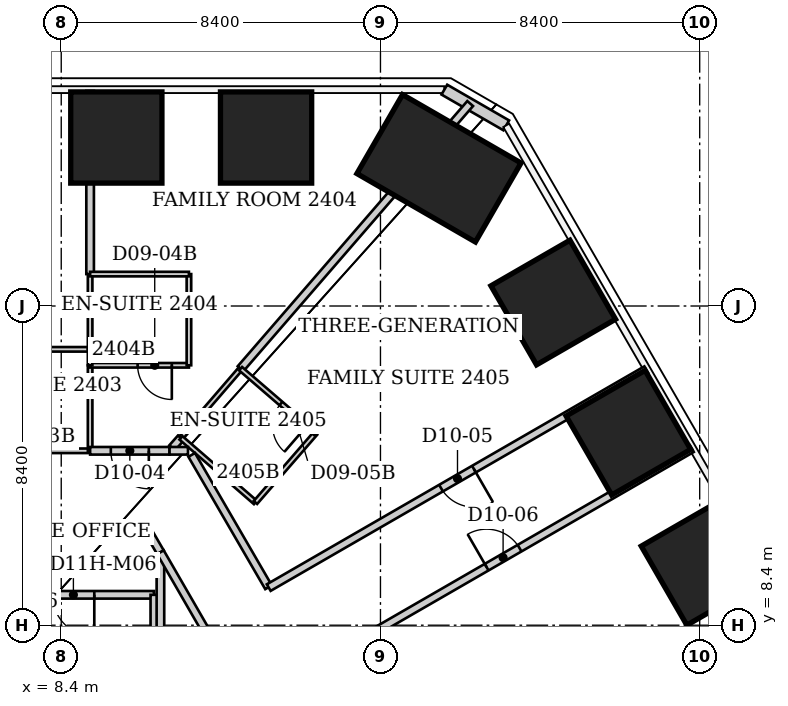
"""IFC4 building model, lengths in metres.
Left out: names, types, materials, properties, quantities, classifications, styles, units other than length and angle.
Written with IfcOpenShell. Run it as: python <this file> out.ifc"""

import sys

from ifc_helpers import new_model, si_unit, direction, frame, frame_2d, origin, origin_2d, place, context, subcontext, project, spatial, rectangle, extrude, element, fill, save


model = new_model("IFC4")
c1 = context("Model", 3, precision=1e-05, world=origin(), true_north=direction((0.0, 1.0)))
c2 = subcontext(c1, "Body", "Model", "MODEL_VIEW")
j1 = project(units=[si_unit("LENGTHUNIT", "METRE"), si_unit("PLANEANGLEUNIT", "RADIAN")], contexts=[c1])
p1 = place(None, origin())
s1 = spatial("IfcSite", under=j1, at=p1, CompositionType="ELEMENT")
p2 = place(p1, origin())
s2 = spatial("IfcBuilding", under=s1, at=p2, CompositionType="ELEMENT")
p3 = place(p2, frame((0.0, 0.0, 100.6)))
s3 = spatial("IfcBuildingStorey", under=s2, at=p3, CompositionType="ELEMENT", Elevation=100.6)
for number, where, z_axis, x_axis in (
    (1, (9.85, 21.234, 0.0), (0.0, 0.0, 1.0), (0.0, 1.0, 0.0)),
    (2, (13.79, 21.234, 0.0), (0.0, 0.0, 1.0), (0.0, 1.0, 0.0)),
):
    element("IfcColumn", number, at=place(p3, frame(where, z_axis=z_axis, x_axis=x_axis)), inside=s3, PredefinedType="COLUMN", context=c2, shape_type="SweptSolid", body=[
        extrude(rectangle(XDim=2.4, YDim=2.4, at=origin_2d()), origin(), (0.0, 0.0, 1.0), 3.8),
    ])
p4 = place(p3, frame((18.339, 20.424, 0.0), z_axis=(0.0, 0.0, 1.0), x_axis=(0.5, 0.866025403784, 0.0)))
e3 = element("IfcColumn", 3, at=p4, inside=s3, PredefinedType="COLUMN", context=c2, shape_type="SweptSolid", body=[
    extrude(rectangle(XDim=2.4, YDim=3.6, at=origin_2d()), origin(), (0.0, 0.0, 1.0), 3.8),
])
for number, where, z_axis, x_axis in (
    (4, (21.346, 16.891, 0.0), (0.0, 0.0, 1.0), (0.866, 0.5, 0.0)),
    (5, (23.324, 13.466, 0.0), (0.0, 0.0, 1.0), (0.866, 0.5, 0.0)),
    (6, (25.302, 10.041, 0.0), (0.0, 0.0, 1.0), (0.866, 0.5, 0.0)),
):
    element("IfcColumn", number, at=place(p3, frame(where, z_axis=z_axis, x_axis=x_axis)), inside=s3, PredefinedType="COLUMN", context=c2, shape_type="SweptSolid", body=[
        extrude(rectangle(XDim=2.4, YDim=2.4, at=origin_2d()), origin(), (0.0, 0.0, 1.0), 3.8),
    ])
p5 = place(p3, frame((18.481, 22.494, 0.0), z_axis=(0.0, 0.0, 1.0), x_axis=(0.865988793993, -0.500063404658, 0.0)))
e7 = element("IfcWall", 7, at=p5, inside=s3, PredefinedType="SOLIDWALL", context=c2, shape_type="SweptSolid", body=[
    extrude(rectangle(XDim=1.88, YDim=0.3, at=frame_2d((0.94, 0.0))), origin(), (0.0, 0.0, 1.0), 3.64),
])
p6 = place(p3, frame((6.6, 10.99, 0.0), z_axis=(0.0, 0.0, 1.0), x_axis=(1.0, 0.0, 0.0)))
e8 = element("IfcWall", 8, at=p6, inside=s3, PredefinedType="PARTITIONING", context=c2, shape_type="SweptSolid", body=[
    extrude(rectangle(XDim=4.02, YDim=0.2, at=frame_2d((2.01, 0.0))), origin(), (0.0, 0.0, 1.0), 3.64),
])
p7 = place(p3, frame((9.16, 12.99, 0.0), z_axis=(0.0, 0.0, 1.0), x_axis=(-1.0, 0.0, 0.0)))
e9 = element("IfcWall", 9, at=p7, inside=s3, PredefinedType="PARTITIONING", context=c2, shape_type="SweptSolid", body=[
    extrude(rectangle(XDim=2.45, YDim=0.12, at=frame_2d((1.225, 0.0))), origin(), (0.0, 0.0, 1.0), 3.64),
])
p8 = place(p3, frame((9.16, 15.24, 0.0), z_axis=(0.0, 0.0, 1.0), x_axis=(0.0, -1.0, 0.0)))
e10 = element("IfcWall", 10, at=p8, inside=s3, PredefinedType="PARTITIONING", context=c2, shape_type="SweptSolid", body=[
    extrude(rectangle(XDim=2.25, YDim=0.12, at=frame_2d((1.125, 0.0))), origin(), (0.0, 0.0, 1.0), 3.64),
])
p9 = place(p3, frame((9.16, 15.24, 0.0), z_axis=(0.0, 0.0, 1.0), x_axis=(1.0, 0.0, 0.0)))
e11 = element("IfcWall", 11, at=p9, inside=s3, PredefinedType="PARTITIONING", context=c2, shape_type="SweptSolid", body=[
    extrude(rectangle(XDim=2.6, YDim=0.12, at=frame_2d((1.3, 0.0))), origin(), (0.0, 0.0, 1.0), 3.64),
])
p10 = place(p9, frame((1.25, 0.0, 0.0)))
e12 = element("IfcOpeningElement", 12, at=p10, cuts=e11, PredefinedType="OPENING", context=c2, shape_type="SweptSolid", body=[
    extrude(rectangle(XDim=0.9, YDim=2.03, at=frame_2d((0.45, 1.015))), frame((0.0, 0.06, 0.0), z_axis=(0.0, -1.0, 0.0), x_axis=(1.0, 0.0, 0.0)), (0.0, 0.0, 1.0), 0.12),
])
p11 = place(p3, frame((9.16, 15.66, 0.0), z_axis=(0.0, 0.0, 1.0), x_axis=(-1.0, 0.0, 0.0)))
e13 = element("IfcWall", 13, at=p11, inside=s3, PredefinedType="PARTITIONING", context=c2, shape_type="SweptSolid", body=[
    extrude(rectangle(XDim=2.45, YDim=0.12, at=frame_2d((1.225, 0.0))), origin(), (0.0, 0.0, 1.0), 3.64),
])
p12 = place(p3, frame((9.16, 15.66, 0.0), z_axis=(0.0, 0.0, 1.0), x_axis=(0.0, -1.0, 0.0)))
e14 = element("IfcWall", 14, at=p12, inside=s3, PredefinedType="PARTITIONING", context=c2, shape_type="SweptSolid", body=[
    extrude(rectangle(XDim=0.42, YDim=0.12, at=frame_2d((0.21, 0.0))), origin(), (0.0, 0.0, 1.0), 3.64),
])
p13 = place(p3, frame((9.16, 17.64, 0.0), z_axis=(0.0, 0.0, 1.0), x_axis=(0.0, -1.0, 0.0)))
e15 = element("IfcWall", 15, at=p13, inside=s3, PredefinedType="PARTITIONING", context=c2, shape_type="SweptSolid", body=[
    extrude(rectangle(XDim=1.98, YDim=0.12, at=frame_2d((0.99, 0.0))), origin(), (0.0, 0.0, 1.0), 3.64),
])
p14 = place(p3, frame((9.16, 22.46, 0.0), z_axis=(0.0, 0.0, 1.0), x_axis=(0.0, -1.0, 0.0)))
e16 = element("IfcWall", 16, at=p14, inside=s3, PredefinedType="PARTITIONING", context=c2, shape_type="SweptSolid", body=[
    extrude(rectangle(XDim=4.82, YDim=0.2, at=frame_2d((2.41, 0.0))), origin(), (0.0, 0.0, 1.0), 3.64),
])
p15 = place(p3, frame((10.62, 10.99, 0.0), z_axis=(0.0, 0.0, 1.0), x_axis=(0.503009091795, -0.864281119527, 0.0)))
e17 = element("IfcWall", 17, at=p15, inside=s3, PredefinedType="PARTITIONING", context=c2, shape_type="SweptSolid", body=[
    extrude(rectangle(XDim=0.775, YDim=0.2, at=frame_2d((0.388, 0.0))), origin(), (0.0, 0.0, 1.0), 3.64),
])
p16 = place(p3, frame((10.84, 9.2, 0.0), z_axis=(0.0, 0.0, 1.0), x_axis=(-1.0, 0.0, 0.0)))
e18 = element("IfcWall", 18, at=p16, inside=s3, PredefinedType="PARTITIONING", context=c2, shape_type="SweptSolid", body=[
    extrude(rectangle(XDim=4.24, YDim=0.2, at=frame_2d((2.12, 0.0))), origin(), (0.0, 0.0, 1.0), 3.64),
])
p17 = place(p16, frame((1.57, 0.0, 0.0)))
e19 = element("IfcOpeningElement", 19, at=p17, cuts=e18, PredefinedType="OPENING", context=c2, shape_type="SweptSolid", body=[
    extrude(rectangle(XDim=1.1, YDim=2.2, at=frame_2d((0.55, 1.1))), frame((0.0, 0.1, 0.0), z_axis=(0.0, -1.0, 0.0), x_axis=(1.0, 0.0, 0.0)), (0.0, 0.0, 1.0), 0.2),
])
p18 = place(p3, frame((10.85, -4.91, 0.0), z_axis=(0.0, 0.0, 1.0), x_axis=(0.0, 1.0, 0.0)))
e20 = element("IfcWall", 20, at=p18, inside=s3, PredefinedType="PARTITIONING", context=c2, shape_type="SweptSolid", body=[
    extrude(rectangle(XDim=14.11, YDim=0.2, at=frame_2d((7.055, 0.0))), origin(), (0.0, 0.0, 1.0), 3.64),
])
p19 = place(p3, frame((11.01, 10.125, 0.0), z_axis=(0.0, 0.0, 1.0), x_axis=(0.0, -1.0, 0.0)))
e21 = element("IfcWall", 21, at=p19, inside=s3, PredefinedType="PARTITIONING", context=c2, shape_type="SweptSolid", body=[
    extrude(rectangle(XDim=14.855, YDim=0.2, at=frame_2d((7.427, 0.0))), origin(), (0.0, 0.0, 1.0), 3.64),
])
p20 = place(p3, frame((11.01, 10.32, 0.0), z_axis=(0.0, 0.0, 1.0), x_axis=(0.500036278648, -0.866004457284, 0.0)))
e22 = element("IfcWall", 22, at=p20, inside=s3, PredefinedType="PARTITIONING", context=c2, shape_type="SweptSolid", body=[
    extrude(rectangle(XDim=8.799, YDim=0.2, at=frame_2d((4.399, 0.0))), origin(), (0.0, 0.0, 1.0), 3.64),
])
p21 = place(p3, frame((11.25, 12.99, 0.0), z_axis=(0.0, 0.0, 1.0), x_axis=(-1.0, 0.0, 0.0)))
e23 = element("IfcWall", 23, at=p21, inside=s3, PredefinedType="PARTITIONING", context=c2, shape_type="SweptSolid", body=[
    extrude(rectangle(XDim=2.09, YDim=0.2, at=frame_2d((1.045, 0.0))), origin(), (0.0, 0.0, 1.0), 3.64),
])
p22 = place(p21, frame((0.545, 0.0, 0.0)))
e24 = element("IfcOpeningElement", 24, at=p22, cuts=e23, PredefinedType="OPENING", context=c2, shape_type="SweptSolid", body=[
    extrude(rectangle(XDim=1.0, YDim=2.13, at=frame_2d((0.5, 1.065))), frame((0.0, 0.1, 0.0), z_axis=(0.0, -1.0, 0.0), x_axis=(1.0, 0.0, 0.0)), (0.0, 0.0, 1.0), 0.2),
])
p23 = place(p3, frame((11.32, 13.069, 0.0), z_axis=(0.0, 0.0, 1.0), x_axis=(0.661575277995, 0.749878757897, 0.0)))
e25 = element("IfcWall", 25, at=p23, inside=s3, PredefinedType="PARTITIONING", context=c2, shape_type="SweptSolid", body=[
    extrude(rectangle(XDim=0.348, YDim=0.2, at=frame_2d((0.174, 0.0))), origin(), (0.0, 0.0, 1.0), 3.64),
])
p24 = place(p3, frame((11.55, 13.33, 0.0), z_axis=(0.0, 0.0, 1.0), x_axis=(0.653238965593, 0.75715180369, 0.0)))
e26 = element("IfcWall", 26, at=p24, inside=s3, PredefinedType="PARTITIONING", context=c2, shape_type="SweptSolid", body=[
    extrude(rectangle(XDim=2.404, YDim=0.12, at=frame_2d((1.202, 0.0))), origin(), (0.0, 0.0, 1.0), 3.64),
])
p25 = place(p3, frame((11.55, 13.33, 0.0), z_axis=(0.0, 0.0, 1.0), x_axis=(0.755437535555, -0.655220672655, 0.0)))
e27 = element("IfcWall", 27, at=p25, inside=s3, PredefinedType="PARTITIONING", context=c2, shape_type="SweptSolid", body=[
    extrude(rectangle(XDim=2.594, YDim=0.12, at=frame_2d((1.297, 0.0))), origin(), (0.0, 0.0, 1.0), 3.64),
])
p26 = place(p3, frame((11.735, 12.99, 0.0), z_axis=(0.0, 0.0, 1.0), x_axis=(-1.0, 0.0, 0.0)))
e28 = element("IfcWall", 28, at=p26, inside=s3, PredefinedType="PARTITIONING", context=c2, shape_type="SweptSolid", body=[
    extrude(rectangle(XDim=0.485, YDim=0.2, at=frame_2d((0.243, 0.0))), origin(), (0.0, 0.0, 1.0), 3.64),
])
p27 = place(p3, frame((11.76, 15.24, 0.0), z_axis=(0.0, 0.0, 1.0), x_axis=(0.0, 1.0, 0.0)))
e29 = element("IfcWall", 29, at=p27, inside=s3, PredefinedType="PARTITIONING", context=c2, shape_type="SweptSolid", body=[
    extrude(rectangle(XDim=2.4, YDim=0.12, at=frame_2d((1.2, 0.0))), origin(), (0.0, 0.0, 1.0), 3.038),
])
p28 = place(p3, frame((11.76, 17.64, 0.0), z_axis=(0.0, 0.0, 1.0), x_axis=(-1.0, 0.0, 0.0)))
e30 = element("IfcWall", 30, at=p28, inside=s3, PredefinedType="PARTITIONING", context=c2, shape_type="SweptSolid", body=[
    extrude(rectangle(XDim=2.6, YDim=0.12, at=frame_2d((1.3, 0.0))), origin(), (0.0, 0.0, 1.0), 3.64),
])
p29 = place(p3, frame((13.12, 15.15, 0.0), z_axis=(0.0, 0.0, 1.0), x_axis=(0.654515490482, 0.756048591507, 0.0)))
e31 = element("IfcWall", 31, at=p29, inside=s3, PredefinedType="PARTITIONING", context=c2, shape_type="SweptSolid", body=[
    extrude(rectangle(XDim=9.229, YDim=0.2, at=frame_2d((4.614, 0.0))), origin(), (0.0, 0.0, 1.0), 3.64),
])
p30 = place(p3, frame((13.51, 11.63, 0.0), z_axis=(0.0, 0.0, 1.0), x_axis=(0.655566599468, 0.75513736079, 0.0)))
e32 = element("IfcWall", 32, at=p30, inside=s3, PredefinedType="PARTITIONING", context=c2, shape_type="SweptSolid", body=[
    extrude(rectangle(XDim=2.41, YDim=0.12, at=frame_2d((1.205, 0.0))), origin(), (0.0, 0.0, 1.0), 3.64),
])
p31 = place(p3, frame((13.855, 9.399, 0.0), z_axis=(0.0, 0.0, 1.0), x_axis=(-0.502087259191, 0.864816965698, 0.0)))
e33 = element("IfcWall", 33, at=p31, inside=s3, PredefinedType="PARTITIONING", context=c2, shape_type="SweptSolid", body=[
    extrude(rectangle(XDim=4.028, YDim=0.2, at=frame_2d((2.014, 0.0))), origin(), (0.0, 0.0, 1.0), 3.64),
])
p32 = place(p3, frame((15.06, 7.31, 0.0), z_axis=(0.0, 0.0, 1.0), x_axis=(0.866042039906, 0.499971184285, 0.0)))
e34 = element("IfcWall", 34, at=p32, inside=s3, PredefinedType="PARTITIONING", context=c2, shape_type="SweptSolid", body=[
    extrude(rectangle(XDim=11.47, YDim=0.2, at=frame_2d((5.735, 0.0))), origin(), (0.0, 0.0, 1.0), 3.64),
])
p33 = place(p32, frame((5.235, 0.0, 0.0)))
e35 = element("IfcOpeningElement", 35, at=p33, cuts=e34, PredefinedType="OPENING", context=c2, shape_type="SweptSolid", body=[
    extrude(rectangle(XDim=1.0, YDim=2.13, at=frame_2d((0.5, 1.065))), frame((0.0, 0.1, 0.0), z_axis=(0.0, -1.0, 0.0), x_axis=(1.0, 0.0, 0.0)), (0.0, 0.0, 1.0), 0.2),
])
p34 = place(p3, frame((15.09, 13.45, 0.0), z_axis=(0.0, 0.0, 1.0), x_axis=(-0.757086659925, 0.653314464377, 0.0)))
e36 = element("IfcWall", 36, at=p34, inside=s3, PredefinedType="PARTITIONING", context=c2, shape_type="SweptSolid", body=[
    extrude(rectangle(XDim=2.602, YDim=0.12, at=frame_2d((1.301, 0.0))), origin(), (0.0, 0.0, 1.0), 3.64),
])
p35 = place(p34, frame((0.3, 0.0, 0.0)))
e37 = element("IfcOpeningElement", 37, at=p35, cuts=e36, PredefinedType="OPENING", context=c2, shape_type="SweptSolid", body=[
    extrude(rectangle(XDim=0.9, YDim=2.03, at=frame_2d((0.45, 1.015))), frame((0.0, 0.06, 0.0), z_axis=(0.0, -1.0, 0.0), x_axis=(1.0, 0.0, 0.0)), (0.0, 0.0, 1.0), 0.12),
])
p36 = place(p3, frame((23.794, 15.125, 0.0), z_axis=(0.0, 0.0, 1.0), x_axis=(-0.866032823784, -0.499987147964, 0.0)))
e38 = element("IfcWall", 38, at=p36, inside=s3, PredefinedType="PARTITIONING", context=c2, shape_type="SweptSolid", body=[
    extrude(rectangle(XDim=11.47, YDim=0.2, at=frame_2d((5.735, 0.0))), origin(), (0.0, 0.0, 1.0), 3.64),
])
p37 = place(p36, frame((5.235, 0.0, 0.0)))
e39 = element("IfcOpeningElement", 39, at=p37, cuts=e38, PredefinedType="OPENING", context=c2, shape_type="SweptSolid", body=[
    extrude(rectangle(XDim=1.0, YDim=2.13, at=frame_2d((0.5, 1.065))), frame((0.0, 0.1, 0.0), z_axis=(0.0, -1.0, 0.0), x_axis=(1.0, 0.0, 0.0)), (0.0, 0.0, 1.0), 0.2),
])
p38 = place(p22, origin())
e40 = element("IfcDoor", 40, at=p38, inside=s3, OperationType="SINGLE_SWING_LEFT", PredefinedType="DOOR", context=c2, shape_type="SweptSolid", body=[
    extrude(rectangle(XDim=1.0, YDim=2.13, at=frame_2d((0.5, 1.065))), frame((0.0, 0.025, 0.0), z_axis=(0.0, -1.0, 0.0), x_axis=(1.0, 0.0, 0.0)), (0.0, 0.0, 1.0), 0.05),
])
fill(e24, e40)
p39 = place(p10, origin())
e41 = element("IfcDoor", 41, at=p39, inside=s3, OperationType="SINGLE_SWING_RIGHT", PredefinedType="DOOR", context=c2, shape_type="SweptSolid", body=[
    extrude(rectangle(XDim=0.9, YDim=2.03, at=frame_2d((0.45, 1.015))), frame((0.0, 0.025, 0.0), z_axis=(0.0, -1.0, 0.0), x_axis=(1.0, 0.0, 0.0)), (0.0, 0.0, 1.0), 0.05),
])
fill(e12, e41)
p40 = place(p37, origin())
e42 = element("IfcDoor", 42, at=p40, inside=s3, OperationType="SINGLE_SWING_LEFT", PredefinedType="DOOR", context=c2, shape_type="SweptSolid", body=[
    extrude(rectangle(XDim=1.0, YDim=2.13, at=frame_2d((0.5, 1.065))), frame((0.0, 0.025, 0.0), z_axis=(0.0, -1.0, 0.0), x_axis=(1.0, 0.0, 0.0)), (0.0, 0.0, 1.0), 0.05),
])
fill(e39, e42)
p41 = place(p35, origin())
e43 = element("IfcDoor", 43, at=p41, inside=s3, OperationType="SINGLE_SWING_LEFT", PredefinedType="DOOR", context=c2, shape_type="SweptSolid", body=[
    extrude(rectangle(XDim=0.9, YDim=2.03, at=frame_2d((0.45, 1.015))), frame((0.0, 0.025, 0.0), z_axis=(0.0, -1.0, 0.0), x_axis=(1.0, 0.0, 0.0)), (0.0, 0.0, 1.0), 0.05),
])
fill(e37, e43)
p42 = place(p33, origin())
e44 = element("IfcDoor", 44, at=p42, inside=s3, OperationType="SINGLE_SWING_LEFT", PredefinedType="DOOR", context=c2, shape_type="SweptSolid", body=[
    extrude(rectangle(XDim=1.0, YDim=2.13, at=frame_2d((0.5, 1.065))), frame((0.0, 0.025, 0.0), z_axis=(0.0, -1.0, 0.0), x_axis=(1.0, 0.0, 0.0)), (0.0, 0.0, 1.0), 0.05),
])
fill(e35, e44)
p43 = place(p17, origin())
e45 = element("IfcDoor", 45, at=p43, inside=s3, OperationType="SINGLE_SWING_LEFT", PredefinedType="DOOR", context=c2, shape_type="SweptSolid", body=[
    extrude(rectangle(XDim=1.1, YDim=2.2, at=frame_2d((0.55, 1.1))), frame((0.0, 0.025, 0.0), z_axis=(0.0, -1.0, 0.0), x_axis=(1.0, 0.0, 0.0)), (0.0, 0.0, 1.0), 0.05),
])
fill(e19, e45)
save(model, sys.argv[1])
